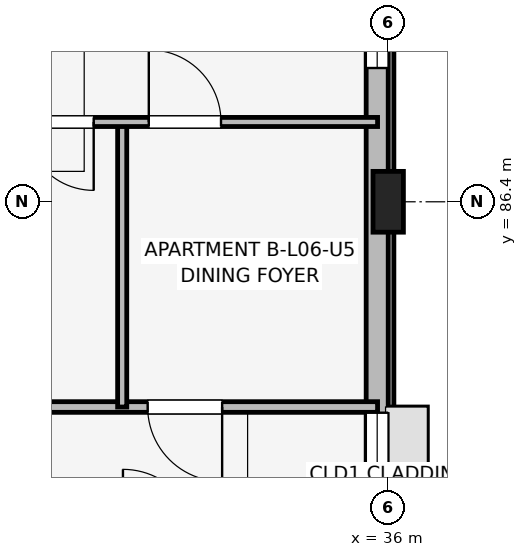
"""IFC4 building model, lengths in metres.
Left out: names, types, materials, properties, quantities, classifications, styles, units other than length and angle.
Written with IfcOpenShell. Run it as: python <this file> out.ifc"""

import sys

from ifc_helpers import new_model, si_unit, direction, frame, frame_2d, origin, origin_2d, place, context, subcontext, project, spatial, rectangle, extrude, element, fill, save


model = new_model("IFC4")
c1 = context("Model", 3, precision=1e-05, world=origin(), true_north=direction((0.0, 1.0)))
c2 = subcontext(c1, "Body", "Model", "MODEL_VIEW")
j1 = project(units=[si_unit("LENGTHUNIT", "METRE"), si_unit("PLANEANGLEUNIT", "RADIAN")], contexts=[c1])
p1 = place(None, origin())
s1 = spatial("IfcSite", under=j1, at=p1, CompositionType="ELEMENT")
p2 = place(p1, origin())
s2 = spatial("IfcBuilding", under=s1, at=p2, CompositionType="ELEMENT")
p3 = place(p2, frame((0.0, 0.0, 21.3)))
s3 = spatial("IfcBuildingStorey", under=s2, at=p3, CompositionType="ELEMENT", Elevation=21.3)
p4 = place(p3, frame((36.0, 86.4, 0.0), z_axis=(0.0, 0.0, 1.0), x_axis=(1.0, 0.0, 0.0)))
e1 = element("IfcColumn", 1, at=p4, inside=s3, PredefinedType="COLUMN", context=c2, shape_type="SweptSolid", body=[
    extrude(rectangle(XDim=0.4, YDim=0.8, at=origin_2d()), origin(), (0.0, 0.0, 1.0), 3.15),
])
p5 = place(p3, frame((35.855, 75.2, 0.0), z_axis=(0.0, 0.0, 1.0), x_axis=(0.0, 1.0, 0.0)))
e2 = element("IfcWall", 2, at=p5, inside=s3, PredefinedType="SOLIDWALL", context=c2, shape_type="SweptSolid", body=[
    extrude(rectangle(XDim=15.2, YDim=0.29, at=frame_2d((7.6, 0.0))), origin(), (0.0, 0.0, 1.0), 2.43),
])
p6 = place(p5, frame((6.775, 0.0, 1.05)))
e3 = element("IfcOpeningElement", 3, at=p6, cuts=e2, PredefinedType="OPENING", context=c2, shape_type="SweptSolid", body=[
    extrude(rectangle(XDim=1.65, YDim=1.15, at=frame_2d((0.825, 0.575))), frame((0.0, 0.155, 0.0), z_axis=(0.0, -1.0, 0.0), x_axis=(1.0, 0.0, 0.0)), (0.0, 0.0, 1.0), 0.31),
])
p7 = place(p5, frame((12.96, 0.0, 0.75)))
e4 = element("IfcOpeningElement", 4, at=p7, cuts=e2, PredefinedType="OPENING", context=c2, shape_type="SweptSolid", body=[
    extrude(rectangle(XDim=1.3, YDim=1.55, at=frame_2d((0.65, 0.775))), frame((0.0, 0.155, 0.0), z_axis=(0.0, -1.0, 0.0), x_axis=(1.0, 0.0, 0.0)), (0.0, 0.0, 1.0), 0.31),
])
p8 = place(p3, frame((28.94, 83.7, 0.0), z_axis=(0.0, 0.0, 1.0), x_axis=(1.0, 0.0, 0.0)))
e5 = element("IfcWall", 5, at=p8, inside=s3, PredefinedType="PARTITIONING", context=c2, shape_type="SweptSolid", body=[
    extrude(rectangle(XDim=6.92, YDim=0.14, at=frame_2d((3.46, 0.0))), origin(), (0.0, 0.0, 1.0), 2.38),
])
p9 = place(p8, frame((4.875, 0.0, 0.0), z_axis=(0.0, 0.0, 1.0), x_axis=(-1.0, 0.0, 0.0)))
e6 = element("IfcOpeningElement", 6, at=p9, cuts=e5, PredefinedType="OPENING", context=c2, shape_type="SweptSolid", body=[
    extrude(rectangle(XDim=0.98, YDim=2.1, at=frame_2d((0.49, 1.05))), frame((0.0, 0.08, 0.0), z_axis=(0.0, -1.0, 0.0), x_axis=(1.0, 0.0, 0.0)), (0.0, 0.0, 1.0), 0.16),
])
p10 = place(p3, frame((32.5, 83.7, 0.0), z_axis=(0.0, 0.0, 1.0), x_axis=(0.0, 1.0, 0.0)))
e7 = element("IfcWall", 7, at=p10, inside=s3, PredefinedType="PARTITIONING", context=c2, shape_type="SweptSolid", body=[
    extrude(rectangle(XDim=3.75, YDim=0.12, at=frame_2d((1.875, 0.0))), origin(), (0.0, 0.0, 1.0), 2.38),
])
p11 = place(p3, frame((28.94, 87.45, 0.0), z_axis=(0.0, 0.0, 1.0), x_axis=(1.0, 0.0, 0.0)))
e8 = element("IfcWall", 8, at=p11, inside=s3, PredefinedType="PARTITIONING", context=c2, shape_type="SweptSolid", body=[
    extrude(rectangle(XDim=6.92, YDim=0.12, at=frame_2d((3.46, 0.0))), origin(), (0.0, 0.0, 1.0), 2.38),
])
p12 = place(p11, frame((0.53, 0.0, 0.0)))
e9 = element("IfcOpeningElement", 9, at=p12, cuts=e8, PredefinedType="OPENING", context=c2, shape_type="SweptSolid", body=[
    extrude(rectangle(XDim=0.85, YDim=2.08, at=frame_2d((0.425, 1.04))), frame((0.0, 0.07, 0.0), z_axis=(0.0, -1.0, 0.0), x_axis=(1.0, 0.0, 0.0)), (0.0, 0.0, 1.0), 0.14),
])
p13 = place(p11, frame((3.185, 0.0, 0.0), z_axis=(0.0, 0.0, 1.0), x_axis=(-1.0, 0.0, 0.0)))
e10 = element("IfcOpeningElement", 10, at=p13, cuts=e8, PredefinedType="OPENING", context=c2, shape_type="SweptSolid", body=[
    extrude(rectangle(XDim=0.9, YDim=2.08, at=frame_2d((0.45, 1.04))), frame((0.0, 0.07, 0.0), z_axis=(0.0, -1.0, 0.0), x_axis=(1.0, 0.0, 0.0)), (0.0, 0.0, 1.0), 0.14),
])
p14 = place(p11, frame((3.91, 0.0, 0.0)))
e11 = element("IfcOpeningElement", 11, at=p14, cuts=e8, PredefinedType="OPENING", context=c2, shape_type="SweptSolid", body=[
    extrude(rectangle(XDim=0.95, YDim=2.08, at=frame_2d((0.475, 1.04))), frame((0.0, 0.07, 0.0), z_axis=(0.0, -1.0, 0.0), x_axis=(1.0, 0.0, 0.0)), (0.0, 0.0, 1.0), 0.14),
])
p15 = place(p6, origin())
e12 = element("IfcWindow", 12, at=p15, inside=s3, PartitioningType="SINGLE_PANEL", PredefinedType="WINDOW", context=c2, shape_type="SweptSolid", body=[
    extrude(rectangle(XDim=1.65, YDim=1.15, at=frame_2d((0.825, 0.575))), frame((0.0, 0.03, 0.0), z_axis=(0.0, -1.0, 0.0), x_axis=(1.0, 0.0, 0.0)), (0.0, 0.0, 1.0), 0.06),
])
fill(e3, e12)
p16 = place(p7, origin())
e13 = element("IfcWindow", 13, at=p16, inside=s3, PartitioningType="SINGLE_PANEL", PredefinedType="WINDOW", context=c2, shape_type="SweptSolid", body=[
    extrude(rectangle(XDim=1.3, YDim=1.55, at=frame_2d((0.65, 0.775))), frame((0.0, 0.03, 0.0), z_axis=(0.0, -1.0, 0.0), x_axis=(1.0, 0.0, 0.0)), (0.0, 0.0, 1.0), 0.06),
])
fill(e4, e13)
p17 = place(p9, origin())
e14 = element("IfcDoor", 14, at=p17, inside=s3, OperationType="SINGLE_SWING_RIGHT", PredefinedType="DOOR", context=c2, shape_type="SweptSolid", body=[
    extrude(rectangle(XDim=0.98, YDim=2.1, at=frame_2d((0.49, 1.05))), frame((0.0, 0.025, 0.0), z_axis=(0.0, -1.0, 0.0), x_axis=(1.0, 0.0, 0.0)), (0.0, 0.0, 1.0), 0.05),
])
fill(e6, e14)
p18 = place(p13, origin())
e15 = element("IfcDoor", 15, at=p18, inside=s3, OperationType="SINGLE_SWING_RIGHT", PredefinedType="DOOR", context=c2, shape_type="SweptSolid", body=[
    extrude(rectangle(XDim=0.9, YDim=2.08, at=frame_2d((0.45, 1.04))), frame((0.0, 0.025, 0.0), z_axis=(0.0, -1.0, 0.0), x_axis=(1.0, 0.0, 0.0)), (0.0, 0.0, 1.0), 0.05),
])
fill(e10, e15)
p19 = place(p14, origin())
e16 = element("IfcDoor", 16, at=p19, inside=s3, OperationType="SINGLE_SWING_LEFT", PredefinedType="DOOR", context=c2, shape_type="SweptSolid", body=[
    extrude(rectangle(XDim=0.95, YDim=2.08, at=frame_2d((0.475, 1.04))), frame((0.0, 0.025, 0.0), z_axis=(0.0, -1.0, 0.0), x_axis=(1.0, 0.0, 0.0)), (0.0, 0.0, 1.0), 0.05),
])
fill(e11, e16)
save(model, sys.argv[1])
